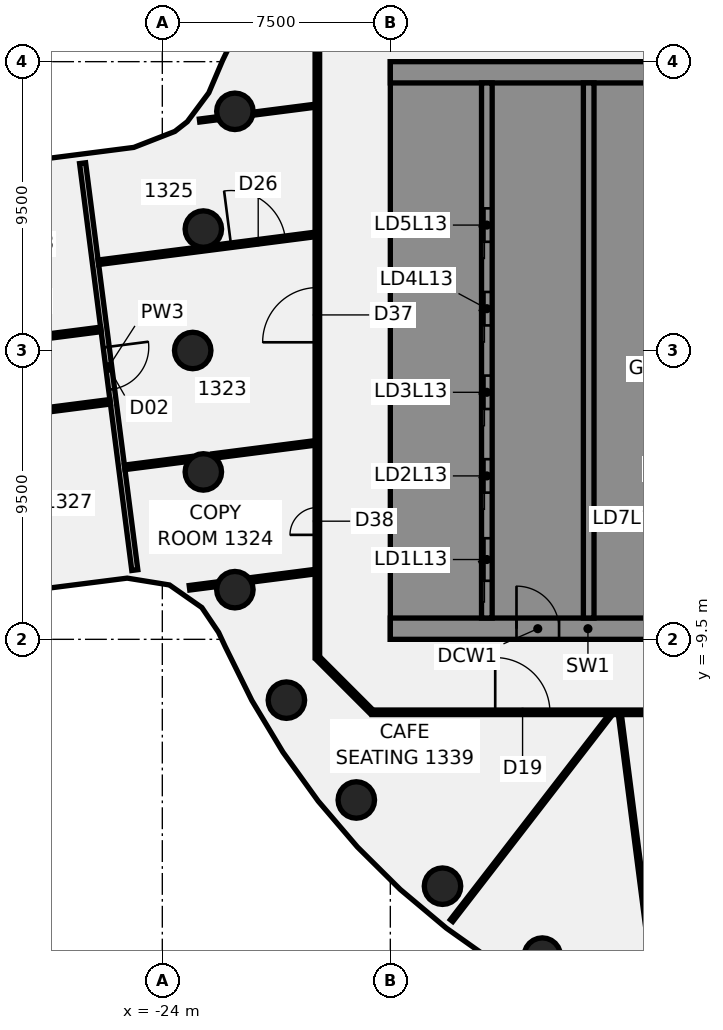
"""IFC4 building model, lengths in metres.
Left out: names, types, materials, properties, quantities, classifications, styles, units other than length and angle.
Written with IfcOpenShell. Run it as: python <this file> out.ifc"""

import sys

from ifc_helpers import new_model, si_unit, direction, frame, frame_2d, origin, origin_2d, place, context, subcontext, project, spatial, polyline, rectangle, circle, outline, extrude, element, fill, save


model = new_model("IFC4")
c1 = context("Model", 3, precision=1e-05, world=origin(), true_north=direction((0.0, 1.0)))
c2 = subcontext(c1, "Body", "Model", "MODEL_VIEW")
j1 = project(units=[si_unit("LENGTHUNIT", "METRE"), si_unit("PLANEANGLEUNIT", "RADIAN")], contexts=[c1])
p1 = place(None, origin())
s1 = spatial("IfcSite", under=j1, at=p1, CompositionType="ELEMENT")
p2 = place(p1, origin())
s2 = spatial("IfcBuilding", under=s1, at=p2, CompositionType="ELEMENT")
p3 = place(p2, frame((0.0, 0.0, 60.25)))
s3 = spatial("IfcBuildingStorey", under=s2, at=p3, CompositionType="ELEMENT", Elevation=60.25)
for number, where, z_axis, x_axis in (
    (1, (-21.613, 7.866, -0.14), (0.0, 0.0, 1.0), (1.0, 0.0, 0.0)),
    (2, (-22.651, 3.994, -0.14), (0.0, 0.0, 1.0), (1.0, 0.0, 0.0)),
    (3, (-23.0, 0.0, -0.14), (0.0, 0.0, 1.0), (1.0, 0.0, 0.0)),
    (4, (-22.651, -3.994, -0.14), (0.0, 0.0, 1.0), (1.0, 0.0, 0.0)),
    (5, (-21.613, -7.866, -0.14), (0.0, 0.0, 1.0), (1.0, 0.0, 0.0)),
    (6, (-19.919, -11.5, -0.14), (0.0, 0.0, 1.0), (1.0, 0.0, 0.0)),
    (7, (-17.619, -14.784, -0.14), (0.0, 0.0, 1.0), (1.0, 0.0, 0.0)),
    (8, (-14.784, -17.619, -0.14), (0.0, 0.0, 1.0), (1.0, 0.0, 0.0)),
    (9, (-11.5, -19.919, -0.14), (0.0, 0.0, 1.0), (1.0, 0.0, 0.0)),
):
    element("IfcColumn", number, at=place(p3, frame(where, z_axis=z_axis, x_axis=x_axis)), inside=s3, PredefinedType="COLUMN", context=c2, shape_type="SweptSolid", body=[
        extrude(circle(Radius=0.6, at=origin_2d()), origin(), (0.0, 0.0, 1.0), 3.75),
    ])
p4 = place(p3, frame((-26.622, 6.161, 0.0), z_axis=(0.0, 0.0, 1.0), x_axis=(0.127256518618, -0.99186983948, 0.0)))
e10 = element("IfcWall", 10, at=p4, inside=s3, PredefinedType="PARTITIONING", context=c2, shape_type="SweptSolid", body=[
    extrude(rectangle(XDim=13.493, YDim=0.2, at=frame_2d((6.746, 0.0))), origin(), (0.0, 0.0, 1.0), 3.01),
])
p5 = place(p4, frame((6.1, 0.0, 0.0)))
e11 = element("IfcOpeningElement", 11, at=p5, cuts=e10, PredefinedType="OPENING", context=c2, shape_type="SweptSolid", body=[
    extrude(rectangle(XDim=1.4, YDim=2.1, at=frame_2d((0.7, 1.05))), frame((0.0, 0.11, 0.0), z_axis=(0.0, -1.0, 0.0), x_axis=(1.0, 0.0, 0.0)), (0.0, 0.0, 1.0), 0.22),
])
p6 = place(p3, frame((-8.951, -11.965, 0.0), z_axis=(0.0, 0.0, 1.0), x_axis=(0.12728771163, -0.99186583693, 0.0)))
e12 = element("IfcWall", 12, at=p6, inside=s3, PredefinedType="PARTITIONING", context=c2, shape_type="SweptSolid", body=[
    extrude(rectangle(XDim=9.134, YDim=0.1, at=frame_2d((4.567, 0.0))), origin(), (0.0, 0.0, 1.0), 3.01),
])
p7 = place(p3, frame((-18.872, -10.128, 0.0), z_axis=(0.0, 0.0, 1.0), x_axis=(0.707106781187, -0.707106781187, 0.0)))
e13 = element("IfcWall", 13, at=p7, inside=s3, PredefinedType="PARTITIONING", context=c2, shape_type="SweptSolid", body=[
    extrude(rectangle(XDim=2.465, YDim=0.15, at=frame_2d((1.232, 0.0))), origin(), (0.0, 0.0, 1.0), 3.01),
])
p8 = place(p3, frame((-17.1, -11.9, 0.0), z_axis=(0.0, 0.0, 1.0), x_axis=(1.0, 0.0, 0.0)))
e14 = element("IfcWall", 14, at=p8, inside=s3, PredefinedType="PARTITIONING", context=c2, shape_type="SweptSolid", body=[
    extrude(rectangle(XDim=34.165, YDim=0.15, at=frame_2d((17.083, 0.0))), origin(), (0.0, 0.0, 1.0), 3.01),
])
p9 = place(p8, frame((14.926, 0.0, 0.0)))
e15 = element("IfcOpeningElement", 15, at=p9, cuts=e14, PredefinedType="OPENING", context=c2, shape_type="SweptSolid", body=[
    extrude(rectangle(XDim=1.8, YDim=2.1, at=frame_2d((0.9, 1.05))), frame((0.0, 0.085, 0.0), z_axis=(0.0, -1.0, 0.0), x_axis=(1.0, 0.0, 0.0)), (0.0, 0.0, 1.0), 0.17),
])
p10 = place(p8, frame((4.05, 0.0, 0.0)))
e16 = element("IfcOpeningElement", 16, at=p10, cuts=e14, PredefinedType="OPENING", context=c2, shape_type="SweptSolid", body=[
    extrude(rectangle(XDim=1.8, YDim=2.1, at=frame_2d((0.9, 1.05))), frame((0.0, 0.085, 0.0), z_axis=(0.0, -1.0, 0.0), x_axis=(1.0, 0.0, 0.0)), (0.0, 0.0, 1.0), 0.17),
])
p11 = place(p8, frame((27.066, 0.0, 0.0)))
e17 = element("IfcOpeningElement", 17, at=p11, cuts=e14, PredefinedType="OPENING", context=c2, shape_type="SweptSolid", body=[
    extrude(rectangle(XDim=1.8, YDim=2.1, at=frame_2d((0.9, 1.05))), frame((0.0, 0.085, 0.0), z_axis=(0.0, -1.0, 0.0), x_axis=(1.0, 0.0, 0.0)), (0.0, 0.0, 1.0), 0.17),
])
p12 = place(p3, frame((-34.464, -2.81, 0.0), z_axis=(0.0, 0.0, 1.0), x_axis=(0.991861062274, 0.127324911717, 0.0)))
e18 = element("IfcWall", 18, at=p12, inside=s3, PredefinedType="PARTITIONING", context=c2, shape_type="SweptSolid", body=[
    extrude(rectangle(XDim=8.82, YDim=0.15, at=frame_2d((4.41, 0.0))), origin(), (0.0, 0.0, 1.0), 3.01),
])
p13 = place(p12, frame((5.17, 0.0, 0.0)))
e19 = element("IfcOpeningElement", 19, at=p13, cuts=e18, PredefinedType="OPENING", context=c2, shape_type="SweptSolid", body=[
    extrude(rectangle(XDim=0.9, YDim=2.1, at=frame_2d((0.45, 1.05))), frame((0.0, 0.085, 0.0), z_axis=(0.0, -1.0, 0.0), x_axis=(1.0, 0.0, 0.0)), (0.0, 0.0, 1.0), 0.17),
])
p14 = place(p3, frame((-29.85, 0.202, 0.0), z_axis=(0.0, 0.0, 1.0), x_axis=(0.991868771711, 0.127264840806, 0.0)))
e20 = element("IfcWall", 20, at=p14, inside=s3, PredefinedType="PARTITIONING", context=c2, shape_type="SweptSolid", body=[
    extrude(rectangle(XDim=3.86, YDim=0.15, at=frame_2d((1.93, 0.0))), origin(), (0.0, 0.0, 1.0), 3.01),
])
p15 = place(p14, frame((1.05, 0.0, 0.0)))
e21 = element("IfcOpeningElement", 21, at=p15, cuts=e20, PredefinedType="OPENING", context=c2, shape_type="SweptSolid", body=[
    extrude(rectangle(XDim=0.9, YDim=2.1, at=frame_2d((0.45, 1.05))), frame((0.0, 0.085, 0.0), z_axis=(0.0, -1.0, 0.0), x_axis=(1.0, 0.0, 0.0)), (0.0, 0.0, 1.0), 0.17),
])
p16 = place(p3, frame((-26.103, 2.902, 0.0), z_axis=(0.0, 0.0, 1.0), x_axis=(0.991864088846, 0.127301332506, 0.0)))
e22 = element("IfcWall", 22, at=p16, inside=s3, PredefinedType="PARTITIONING", context=c2, shape_type="SweptSolid", body=[
    extrude(rectangle(XDim=7.192, YDim=0.15, at=frame_2d((3.596, 0.0))), origin(), (0.0, 0.0, 1.0), 3.01),
])
p17 = place(p16, frame((4.4, 0.0, 0.0)))
e23 = element("IfcOpeningElement", 23, at=p17, cuts=e22, PredefinedType="OPENING", context=c2, shape_type="SweptSolid", body=[
    extrude(rectangle(XDim=1.8, YDim=2.1, at=frame_2d((0.9, 1.05))), frame((0.0, 0.085, 0.0), z_axis=(0.0, -1.0, 0.0), x_axis=(1.0, 0.0, 0.0)), (0.0, 0.0, 1.0), 0.17),
])
p18 = place(p3, frame((-25.237, -3.843, 0.0), z_axis=(0.0, 0.0, 1.0), x_axis=(0.991864800905, 0.127295784398, 0.0)))
e24 = element("IfcWall", 24, at=p18, inside=s3, PredefinedType="PARTITIONING", context=c2, shape_type="SweptSolid", body=[
    extrude(rectangle(XDim=2.202, YDim=0.15, at=frame_2d((1.101, 0.0))), origin(), (0.0, 0.0, 1.0), 3.01),
])
p19 = place(p3, frame((-22.34, -3.471, 0.0), z_axis=(0.0, 0.0, 1.0), x_axis=(0.99186236677, 0.127314749288, 0.0)))
e25 = element("IfcWall", 25, at=p19, inside=s3, PredefinedType="PARTITIONING", context=c2, shape_type="SweptSolid", body=[
    extrude(rectangle(XDim=3.398, YDim=0.15, at=frame_2d((1.699, 0.0))), origin(), (0.0, 0.0, 1.0), 3.01),
])
p20 = place(p3, frame((-23.106, -7.804, 0.0), z_axis=(0.0, 0.0, 1.0), x_axis=(0.991864852242, 0.127295384389, 0.0)))
e26 = element("IfcWall", 26, at=p20, inside=s3, PredefinedType="PARTITIONING", context=c2, shape_type="SweptSolid", body=[
    extrude(rectangle(XDim=0.94, YDim=0.15, at=frame_2d((0.47, 0.0))), origin(), (0.0, 0.0, 1.0), 3.01),
])
p21 = place(p3, frame((-21.1, -7.546, 0.0), z_axis=(0.0, 0.0, 1.0), x_axis=(0.991863273409, 0.127307685792, 0.0)))
e27 = element("IfcWall", 27, at=p21, inside=s3, PredefinedType="PARTITIONING", context=c2, shape_type="SweptSolid", body=[
    extrude(rectangle(XDim=2.148, YDim=0.15, at=frame_2d((1.074, 0.0))), origin(), (0.0, 0.0, 1.0), 3.01),
])
p22 = place(p3, frame((-22.775, 7.563, 0.0), z_axis=(0.0, 0.0, 1.0), x_axis=(0.991914874359, 0.126905011825, 0.0)))
e28 = element("IfcWall", 28, at=p22, inside=s3, PredefinedType="PARTITIONING", context=c2, shape_type="SweptSolid", body=[
    extrude(rectangle(XDim=0.617, YDim=0.1, at=frame_2d((0.309, 0.0))), origin(), (0.0, 0.0, 1.0), 3.01),
])
p23 = place(p3, frame((-21.024, 7.788, 0.0), z_axis=(0.0, 0.0, 1.0), x_axis=(0.991872915336, 0.127232542311, 0.0)))
e29 = element("IfcWall", 29, at=p23, inside=s3, PredefinedType="PARTITIONING", context=c2, shape_type="SweptSolid", body=[
    extrude(rectangle(XDim=2.076, YDim=0.1, at=frame_2d((1.038, 0.0))), origin(), (0.0, 0.0, 1.0), 3.01),
])
p24 = place(p3, frame((-14.485, -18.751, 0.0), z_axis=(0.0, 0.0, 1.0), x_axis=(0.611328797993, 0.791376712284, 0.0)))
e30 = element("IfcWall", 30, at=p24, inside=s3, PredefinedType="PARTITIONING", context=c2, shape_type="SweptSolid", body=[
    extrude(rectangle(XDim=8.547, YDim=0.1, at=frame_2d((4.273, 0.0))), origin(), (0.0, 0.0, 1.0), 3.01),
])
p25 = place(p3, frame((-18.9, -10.1, 0.0), z_axis=(0.0, 0.0, 1.0), x_axis=(0.0, 1.0, 0.0)))
e31 = element("IfcWall", 31, at=p25, inside=s3, PredefinedType="PARTITIONING", context=c2, shape_type="SweptSolid", body=[
    extrude(rectangle(XDim=20.2, YDim=0.15, at=frame_2d((10.1, 0.0))), origin(), (0.0, 0.0, 1.0), 3.01),
])
p26 = place(p25, frame((10.37, 0.0, 0.0)))
e32 = element("IfcOpeningElement", 32, at=p26, cuts=e31, PredefinedType="OPENING", context=c2, shape_type="SweptSolid", body=[
    extrude(rectangle(XDim=1.8, YDim=2.1, at=frame_2d((0.9, 1.05))), frame((0.0, 0.085, 0.0), z_axis=(0.0, -1.0, 0.0), x_axis=(1.0, 0.0, 0.0)), (0.0, 0.0, 1.0), 0.17),
])
p27 = place(p25, frame((4.036, 0.0, 0.0)))
e33 = element("IfcOpeningElement", 33, at=p27, cuts=e31, PredefinedType="OPENING", context=c2, shape_type="SweptSolid", body=[
    extrude(rectangle(XDim=0.9, YDim=2.1, at=frame_2d((0.45, 1.05))), frame((0.0, 0.085, 0.0), z_axis=(0.0, -1.0, 0.0), x_axis=(1.0, 0.0, 0.0)), (0.0, 0.0, 1.0), 0.17),
])
p28 = place(p3, frame((-16.5, -9.15, 0.0), z_axis=(0.0, 0.0, 1.0), x_axis=(1.0, 0.0, 0.0)))
e34 = element("IfcWall", 34, at=p28, inside=s3, PredefinedType="SHEAR", context=c2, shape_type="SweptSolid", body=[
    extrude(rectangle(XDim=13.0, YDim=0.7, at=frame_2d((6.5, 0.0))), origin(), (0.0, 0.0, 1.0), 3.61),
])
p29 = place(p28, frame((4.15, 0.0, 0.0)))
e35 = element("IfcOpeningElement", 35, at=p29, cuts=e34, PredefinedType="OPENING", context=c2, shape_type="SweptSolid", body=[
    extrude(rectangle(XDim=1.4, YDim=2.1, at=frame_2d((0.7, 1.05))), frame((0.0, 0.36, 0.0), z_axis=(0.0, -1.0, 0.0), x_axis=(1.0, 0.0, 0.0)), (0.0, 0.0, 1.0), 0.72),
])
p30 = place(p28, frame((10.125, 0.0, 0.0)))
e36 = element("IfcOpeningElement", 36, at=p30, cuts=e34, PredefinedType="OPENING", context=c2, shape_type="SweptSolid", body=[
    extrude(rectangle(XDim=1.4, YDim=2.1, at=frame_2d((0.7, 1.05))), frame((0.0, 0.36, 0.0), z_axis=(0.0, -1.0, 0.0), x_axis=(1.0, 0.0, 0.0)), (0.0, 0.0, 1.0), 0.72),
])
p31 = place(p3, origin())
e37 = element("IfcWall", 37, at=p31, inside=s3, PredefinedType="SHEAR", context=c2, shape_type="SweptSolid", body=[
    extrude(outline(polyline([(-13.5, -8.8), (-13.5, -8.125), (-15.8, -8.125), (-15.8, -5.625), (-13.5, -5.625), (-13.5, -5.375), (-15.8, -5.375), (-15.8, -2.875), (-13.5, -2.875), (-13.5, -2.625), (-15.8, -2.625), (-15.8, -0.125), (-13.5, -0.125), (-13.5, 0.125), (-15.8, 0.125), (-15.8, 2.625), (-13.5, 2.625), (-13.5, 2.875), (-15.8, 2.875), (-15.8, 5.375), (-13.5, 5.375), (-13.5, 5.625), (-15.8, 5.625), (-15.8, 8.125), (-13.5, 8.125), (-13.5, 8.8), (-15.8, 8.8), (-16.5, 8.8), (-16.5, -8.8), (-15.8, -8.8), (-13.5, -8.8)])), origin(), (0.0, 0.0, 1.0), 3.61),
])
p32 = place(p3, frame((-16.5, 9.15, 0.0), z_axis=(0.0, 0.0, 1.0), x_axis=(1.0, 0.0, 0.0)))
e38 = element("IfcWall", 38, at=p32, inside=s3, PredefinedType="SHEAR", context=c2, shape_type="SweptSolid", body=[
    extrude(rectangle(XDim=13.0, YDim=0.7, at=frame_2d((6.5, 0.0))), origin(), (0.0, 0.0, 1.0), 3.61),
])
p33 = place(p3, origin())
e39 = element("IfcWall", 39, at=p33, inside=s3, PredefinedType="SHEAR", context=c2, shape_type="SweptSolid", body=[
    extrude(outline(polyline([(-9.8, -5.375), (-9.8, -5.625), (-7.5, -5.625), (-7.15, -5.625), (-7.15, 8.8), (-7.5, 8.8), (-9.8, 8.8), (-9.8, 8.125), (-7.5, 8.125), (-7.5, 5.625), (-9.8, 5.625), (-9.8, 5.375), (-7.5, 5.375), (-7.5, 2.875), (-9.8, 2.875), (-9.8, 2.625), (-7.5, 2.625), (-7.5, 0.125), (-9.8, 0.125), (-9.8, -0.125), (-7.5, -0.125), (-7.5, -2.625), (-9.8, -2.625), (-9.8, -2.875), (-7.5, -2.875), (-7.5, -5.375), (-9.8, -5.375)])), origin(), (0.0, 0.0, 1.0), 3.61),
])
p34 = place(p3, origin())
e40 = element("IfcWall", 40, at=p34, inside=s3, PredefinedType="SHEAR", context=c2, shape_type="SweptSolid", body=[
    extrude(outline(polyline([(-7.5, -8.125), (-9.55, -8.125), (-9.55, -5.625), (-9.8, -5.625), (-9.8, -8.125), (-9.8, -8.8), (-7.5, -8.8), (-7.5, -8.125)])), origin(), (0.0, 0.0, 1.0), 3.61),
])
p35 = place(p3, frame((-13.325, -8.8, 0.0), z_axis=(0.0, 0.0, 1.0), x_axis=(0.0, 1.0, 0.0)))
e41 = element("IfcWall", 41, at=p35, inside=s3, PredefinedType="SHEAR", context=c2, shape_type="SweptSolid", body=[
    extrude(rectangle(XDim=17.6, YDim=0.35, at=frame_2d((8.8, 0.0))), origin(), (0.0, 0.0, 1.0), 3.61),
])
p36 = place(p35, frame((1.225, 0.0, 0.0)))
e42 = element("IfcOpeningElement", 42, at=p36, cuts=e41, PredefinedType="OPENING", context=c2, shape_type="SweptSolid", body=[
    extrude(rectangle(XDim=1.4, YDim=2.1, at=frame_2d((0.7, 1.05))), frame((0.0, 0.185, 0.0), z_axis=(0.0, -1.0, 0.0), x_axis=(1.0, 0.0, 0.0)), (0.0, 0.0, 1.0), 0.37),
])
p37 = place(p35, frame((4.125, 0.0, 0.0)))
e43 = element("IfcOpeningElement", 43, at=p37, cuts=e41, PredefinedType="OPENING", context=c2, shape_type="SweptSolid", body=[
    extrude(rectangle(XDim=1.1, YDim=2.1, at=frame_2d((0.55, 1.05))), frame((0.0, 0.185, 0.0), z_axis=(0.0, -1.0, 0.0), x_axis=(1.0, 0.0, 0.0)), (0.0, 0.0, 1.0), 0.37),
])
p38 = place(p35, frame((6.875, 0.0, 0.0)))
e44 = element("IfcOpeningElement", 44, at=p38, cuts=e41, PredefinedType="OPENING", context=c2, shape_type="SweptSolid", body=[
    extrude(rectangle(XDim=1.1, YDim=2.1, at=frame_2d((0.55, 1.05))), frame((0.0, 0.185, 0.0), z_axis=(0.0, -1.0, 0.0), x_axis=(1.0, 0.0, 0.0)), (0.0, 0.0, 1.0), 0.37),
])
p39 = place(p35, frame((9.625, 0.0, 0.0)))
e45 = element("IfcOpeningElement", 45, at=p39, cuts=e41, PredefinedType="OPENING", context=c2, shape_type="SweptSolid", body=[
    extrude(rectangle(XDim=1.1, YDim=2.1, at=frame_2d((0.55, 1.05))), frame((0.0, 0.185, 0.0), z_axis=(0.0, -1.0, 0.0), x_axis=(1.0, 0.0, 0.0)), (0.0, 0.0, 1.0), 0.37),
])
p40 = place(p35, frame((12.375, 0.0, 0.0)))
e46 = element("IfcOpeningElement", 46, at=p40, cuts=e41, PredefinedType="OPENING", context=c2, shape_type="SweptSolid", body=[
    extrude(rectangle(XDim=1.1, YDim=2.1, at=frame_2d((0.55, 1.05))), frame((0.0, 0.185, 0.0), z_axis=(0.0, -1.0, 0.0), x_axis=(1.0, 0.0, 0.0)), (0.0, 0.0, 1.0), 0.37),
])
p41 = place(p3, frame((-9.975, -8.8, 0.0), z_axis=(0.0, 0.0, 1.0), x_axis=(0.0, 1.0, 0.0)))
e47 = element("IfcWall", 47, at=p41, inside=s3, PredefinedType="SHEAR", context=c2, shape_type="SweptSolid", body=[
    extrude(rectangle(XDim=17.6, YDim=0.35, at=frame_2d((8.8, 0.0))), origin(), (0.0, 0.0, 1.0), 3.61),
])
p42 = place(p5, origin())
e48 = element("IfcDoor", 48, at=p42, inside=s3, OperationType="DOUBLE_DOOR_SINGLE_SWING", PredefinedType="DOOR", context=c2, shape_type="SweptSolid", body=[
    extrude(rectangle(XDim=1.4, YDim=2.1, at=frame_2d((0.7, 1.05))), frame((0.0, 0.025, 0.0), z_axis=(0.0, -1.0, 0.0), x_axis=(1.0, 0.0, 0.0)), (0.0, 0.0, 1.0), 0.05),
])
fill(e11, e48)
p43 = place(p10, frame((1.8, 0.0, 0.0), z_axis=(0.0, 0.0, 1.0), x_axis=(-1.0, 0.0, 0.0)))
e49 = element("IfcDoor", 49, at=p43, inside=s3, OperationType="DOUBLE_DOOR_SINGLE_SWING", PredefinedType="DOOR", context=c2, shape_type="SweptSolid", body=[
    extrude(rectangle(XDim=1.8, YDim=2.1, at=frame_2d((0.9, 1.05))), frame((0.0, 0.025, 0.0), z_axis=(0.0, -1.0, 0.0), x_axis=(1.0, 0.0, 0.0)), (0.0, 0.0, 1.0), 0.05),
])
fill(e16, e49)
p44 = place(p17, origin())
e50 = element("IfcDoor", 50, at=p44, inside=s3, OperationType="DOUBLE_DOOR_SINGLE_SWING", PredefinedType="DOOR", context=c2, shape_type="SweptSolid", body=[
    extrude(rectangle(XDim=1.8, YDim=2.1, at=frame_2d((0.9, 1.05))), frame((0.0, 0.025, 0.0), z_axis=(0.0, -1.0, 0.0), x_axis=(1.0, 0.0, 0.0)), (0.0, 0.0, 1.0), 0.05),
])
fill(e23, e50)
p45 = place(p26, frame((1.8, 0.0, 0.0), z_axis=(0.0, 0.0, 1.0), x_axis=(-1.0, 0.0, 0.0)))
e51 = element("IfcDoor", 51, at=p45, inside=s3, OperationType="DOUBLE_DOOR_SINGLE_SWING", PredefinedType="DOOR", context=c2, shape_type="SweptSolid", body=[
    extrude(rectangle(XDim=1.8, YDim=2.1, at=frame_2d((0.9, 1.05))), frame((0.0, 0.025, 0.0), z_axis=(0.0, -1.0, 0.0), x_axis=(1.0, 0.0, 0.0)), (0.0, 0.0, 1.0), 0.05),
])
fill(e32, e51)
p46 = place(p27, origin())
e52 = element("IfcDoor", 52, at=p46, inside=s3, OperationType="SINGLE_SWING_RIGHT", PredefinedType="DOOR", context=c2, shape_type="SweptSolid", body=[
    extrude(rectangle(XDim=0.9, YDim=2.1, at=frame_2d((0.45, 1.05))), frame((0.0, 0.025, 0.0), z_axis=(0.0, -1.0, 0.0), x_axis=(1.0, 0.0, 0.0)), (0.0, 0.0, 1.0), 0.05),
])
fill(e33, e52)
p47 = place(p29, origin())
e53 = element("IfcDoor", 53, at=p47, inside=s3, OperationType="SINGLE_SWING_LEFT", PredefinedType="DOOR", context=c2, shape_type="SweptSolid", body=[
    extrude(rectangle(XDim=1.4, YDim=2.1, at=frame_2d((0.7, 1.05))), frame((0.0, 0.025, 0.0), z_axis=(0.0, -1.0, 0.0), x_axis=(1.0, 0.0, 0.0)), (0.0, 0.0, 1.0), 0.05),
])
fill(e35, e53)
p48 = place(p36, origin())
e54 = element("IfcDoor", 54, at=p48, inside=s3, OperationType="SLIDING_TO_LEFT", PredefinedType="DOOR", context=c2, shape_type="SweptSolid", body=[
    extrude(rectangle(XDim=1.4, YDim=2.1, at=frame_2d((0.7, 1.05))), frame((0.0, 0.025, 0.0), z_axis=(0.0, -1.0, 0.0), x_axis=(1.0, 0.0, 0.0)), (0.0, 0.0, 1.0), 0.05),
])
fill(e42, e54)
p49 = place(p37, origin())
e55 = element("IfcDoor", 55, at=p49, inside=s3, OperationType="SLIDING_TO_LEFT", PredefinedType="DOOR", context=c2, shape_type="SweptSolid", body=[
    extrude(rectangle(XDim=1.1, YDim=2.1, at=frame_2d((0.55, 1.05))), frame((0.0, 0.025, 0.0), z_axis=(0.0, -1.0, 0.0), x_axis=(1.0, 0.0, 0.0)), (0.0, 0.0, 1.0), 0.05),
])
fill(e43, e55)
p50 = place(p38, origin())
e56 = element("IfcDoor", 56, at=p50, inside=s3, OperationType="SLIDING_TO_LEFT", PredefinedType="DOOR", context=c2, shape_type="SweptSolid", body=[
    extrude(rectangle(XDim=1.1, YDim=2.1, at=frame_2d((0.55, 1.05))), frame((0.0, 0.025, 0.0), z_axis=(0.0, -1.0, 0.0), x_axis=(1.0, 0.0, 0.0)), (0.0, 0.0, 1.0), 0.05),
])
fill(e44, e56)
p51 = place(p39, origin())
e57 = element("IfcDoor", 57, at=p51, inside=s3, OperationType="SLIDING_TO_LEFT", PredefinedType="DOOR", context=c2, shape_type="SweptSolid", body=[
    extrude(rectangle(XDim=1.1, YDim=2.1, at=frame_2d((0.55, 1.05))), frame((0.0, 0.025, 0.0), z_axis=(0.0, -1.0, 0.0), x_axis=(1.0, 0.0, 0.0)), (0.0, 0.0, 1.0), 0.05),
])
fill(e45, e57)
p52 = place(p40, origin())
e58 = element("IfcDoor", 58, at=p52, inside=s3, OperationType="SLIDING_TO_LEFT", PredefinedType="DOOR", context=c2, shape_type="SweptSolid", body=[
    extrude(rectangle(XDim=1.1, YDim=2.1, at=frame_2d((0.55, 1.05))), frame((0.0, 0.025, 0.0), z_axis=(0.0, -1.0, 0.0), x_axis=(1.0, 0.0, 0.0)), (0.0, 0.0, 1.0), 0.05),
])
fill(e46, e58)
save(model, sys.argv[1])
